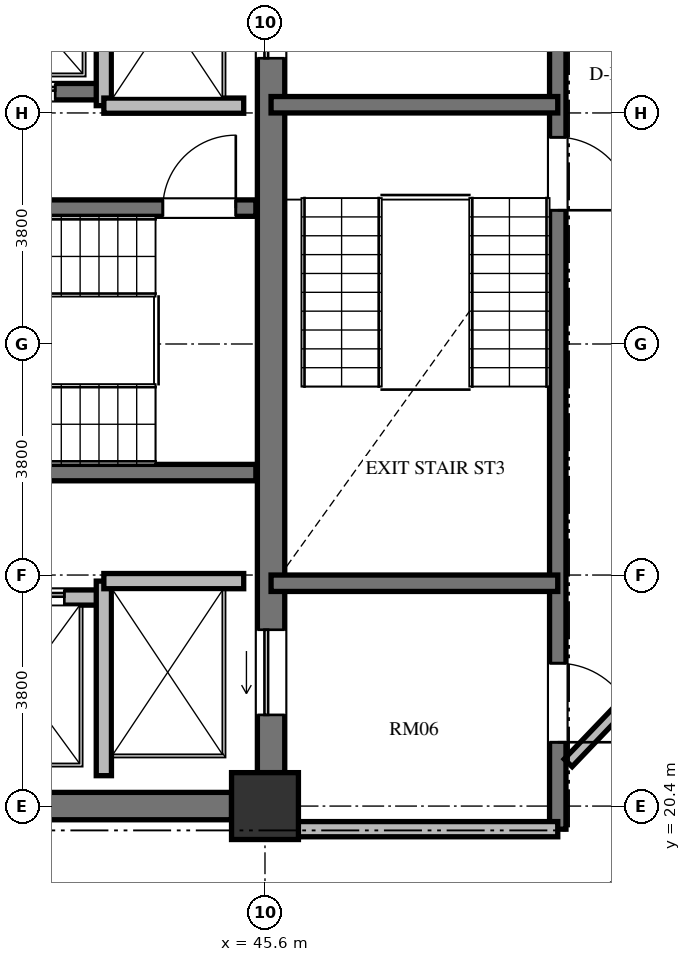
"""IFC4 building model, lengths in metres.
Left out: names, types, materials, properties, quantities, classifications, styles, units other than length and angle.
Written with IfcOpenShell. Run it as: python <this file> out.ifc"""

import sys

from ifc_helpers import new_model, si_unit, direction, frame, frame_2d, origin, origin_2d, place, context, subcontext, project, spatial, rectangle, extrude, element, fill, save


model = new_model("IFC4")
c1 = context("Model", 3, precision=1e-05, world=origin(), true_north=direction((0.0, 1.0)))
c2 = subcontext(c1, "Body", "Model", "MODEL_VIEW")
j1 = project(units=[si_unit("LENGTHUNIT", "METRE"), si_unit("PLANEANGLEUNIT", "RADIAN")], contexts=[c1])
p1 = place(None, origin())
s1 = spatial("IfcSite", under=j1, at=p1, CompositionType="ELEMENT")
p2 = place(p1, origin())
s2 = spatial("IfcBuilding", under=s1, at=p2, CompositionType="ELEMENT")
p3 = place(p2, frame((0.0, 0.0, 242.256)))
s3 = spatial("IfcBuildingStorey", under=s2, at=p3, CompositionType="ELEMENT", Elevation=242.256)
p4 = place(p3, frame((45.6, 20.4, 0.0), z_axis=(0.0, 0.0, 1.0), x_axis=(1.0, 0.0, 0.0)))
e1 = element("IfcColumn", 1, at=p4, inside=s3, PredefinedType="COLUMN", context=c2, shape_type="SweptSolid", body=[
    extrude(rectangle(XDim=1.1, YDim=1.1, at=origin_2d()), origin(), (0.0, 0.0, 1.0), 3.648),
])
p5 = place(p3, frame((45.7, 20.95, 0.0), z_axis=(0.0, 0.0, 1.0), x_axis=(0.0, 1.0, 0.0)))
e2 = element("IfcWall", 2, at=p5, inside=s3, PredefinedType="SHEAR", context=c2, shape_type="SweptSolid", body=[
    extrude(rectangle(XDim=14.1, YDim=0.45, at=frame_2d((7.05, 0.0))), origin(), (0.0, 0.0, 1.0), 3.648),
])
p6 = place(p5, frame((11.75, 0.0, 0.0)))
e3 = element("IfcOpeningElement", 3, at=p6, cuts=e2, PredefinedType="OPENING", context=c2, shape_type="SweptSolid", body=[
    extrude(rectangle(XDim=1.4, YDim=2.3, at=frame_2d((0.7, 1.15))), frame((0.0, 0.235, 0.0), z_axis=(0.0, -1.0, 0.0), x_axis=(1.0, 0.0, 0.0)), (0.0, 0.0, 1.0), 0.47),
])
p7 = place(p5, frame((0.95, 0.0, 0.0)))
e4 = element("IfcOpeningElement", 4, at=p7, cuts=e2, PredefinedType="OPENING", context=c2, shape_type="SweptSolid", body=[
    extrude(rectangle(XDim=1.4, YDim=2.3, at=frame_2d((0.7, 1.15))), frame((0.0, 0.235, 0.0), z_axis=(0.0, -1.0, 0.0), x_axis=(1.0, 0.0, 0.0)), (0.0, 0.0, 1.0), 0.47),
])
p8 = place(p3, frame((39.6, 20.4, 0.0), z_axis=(0.0, 0.0, 1.0), x_axis=(1.0, 0.0, 0.0)))
e5 = element("IfcWall", 5, at=p8, inside=s3, PredefinedType="SHEAR", context=c2, shape_type="SweptSolid", body=[
    extrude(rectangle(XDim=5.45, YDim=0.45, at=frame_2d((2.725, 0.0))), origin(), (0.0, 0.0, 1.0), 3.648),
])
p9 = place(p3, frame((37.465, 30.235, 0.0), z_axis=(0.0, 0.0, 1.0), x_axis=(1.0, 0.0, 0.0)))
e6 = element("IfcWall", 6, at=p9, inside=s3, PredefinedType="SHEAR", context=c2, shape_type="SweptSolid", body=[
    extrude(rectangle(XDim=7.985, YDim=0.27, at=frame_2d((3.992, 0.0))), origin(), (0.0, 0.0, 1.0), 3.648),
])
p10 = place(p9, frame((6.455, 0.0, 0.0)))
e7 = element("IfcOpeningElement", 7, at=p10, cuts=e6, PredefinedType="OPENING", context=c2, shape_type="SweptSolid", body=[
    extrude(rectangle(XDim=1.2, YDim=2.15, at=frame_2d((0.6, 1.075))), frame((0.0, 0.145, 0.0), z_axis=(0.0, -1.0, 0.0), x_axis=(1.0, 0.0, 0.0)), (0.0, 0.0, 1.0), 0.29),
])
p11 = place(p3, frame((37.465, 25.885, 0.0), z_axis=(0.0, 0.0, 1.0), x_axis=(1.0, 0.0, 0.0)))
e8 = element("IfcWall", 8, at=p11, inside=s3, PredefinedType="SHEAR", context=c2, shape_type="SweptSolid", body=[
    extrude(rectangle(XDim=7.985, YDim=0.27, at=frame_2d((3.992, 0.0))), origin(), (0.0, 0.0, 1.0), 3.648),
])
p12 = place(p3, frame((26.55, 32.15, 0.0), z_axis=(0.0, 0.0, 1.0), x_axis=(1.0, 0.0, 0.0)))
e9 = element("IfcWall", 9, at=p12, inside=s3, PredefinedType="SHEAR", context=c2, shape_type="SweptSolid", body=[
    extrude(rectangle(XDim=16.4, YDim=0.27, at=frame_2d((8.2, 0.0))), origin(), (0.0, 0.0, 1.0), 3.648),
])
p13 = place(p12, frame((5.125, 0.0, 0.0)))
e10 = element("IfcOpeningElement", 10, at=p13, cuts=e9, PredefinedType="OPENING", context=c2, shape_type="SweptSolid", body=[
    extrude(rectangle(XDim=1.05, YDim=2.15, at=frame_2d((0.525, 1.075))), frame((0.0, 0.145, 0.0), z_axis=(0.0, -1.0, 0.0), x_axis=(1.0, 0.0, 0.0)), (0.0, 0.0, 1.0), 0.29),
])
p14 = place(p12, frame((11.9, 0.0, 0.0)))
e11 = element("IfcOpeningElement", 11, at=p14, cuts=e9, PredefinedType="OPENING", context=c2, shape_type="SweptSolid", body=[
    extrude(rectangle(XDim=1.1, YDim=2.2, at=frame_2d((0.55, 1.1))), frame((0.0, 0.145, 0.0), z_axis=(0.0, -1.0, 0.0), x_axis=(1.0, 0.0, 0.0)), (0.0, 0.0, 1.0), 0.29),
])
p15 = place(p12, frame((14.5, 0.0, 0.0)))
e12 = element("IfcOpeningElement", 12, at=p15, cuts=e9, PredefinedType="OPENING", context=c2, shape_type="SweptSolid", body=[
    extrude(rectangle(XDim=1.1, YDim=2.2, at=frame_2d((0.55, 1.1))), frame((0.0, 0.145, 0.0), z_axis=(0.0, -1.0, 0.0), x_axis=(1.0, 0.0, 0.0)), (0.0, 0.0, 1.0), 0.29),
])
p16 = place(p3, frame((26.75, 23.83, 0.0), z_axis=(0.0, 0.0, 1.0), x_axis=(1.0, 0.0, 0.0)))
e13 = element("IfcWall", 13, at=p16, inside=s3, PredefinedType="SOLIDWALL", context=c2, shape_type="SweptSolid", body=[
    extrude(rectangle(XDim=16.2, YDim=0.25, at=frame_2d((8.1, 0.0))), origin(), (0.0, 0.0, 1.0), 3.198),
])
p17 = place(p16, frame((4.75, 0.0, 0.0)))
e14 = element("IfcOpeningElement", 14, at=p17, cuts=e13, PredefinedType="OPENING", context=c2, shape_type="SweptSolid", body=[
    extrude(rectangle(XDim=1.4, YDim=2.2, at=frame_2d((0.7, 1.1))), frame((0.0, 0.135, 0.0), z_axis=(0.0, -1.0, 0.0), x_axis=(1.0, 0.0, 0.0)), (0.0, 0.0, 1.0), 0.27),
])
p18 = place(p16, frame((11.7, 0.0, 0.0)))
e15 = element("IfcOpeningElement", 15, at=p18, cuts=e13, PredefinedType="OPENING", context=c2, shape_type="SweptSolid", body=[
    extrude(rectangle(XDim=1.1, YDim=2.2, at=frame_2d((0.55, 1.1))), frame((0.0, 0.135, 0.0), z_axis=(0.0, -1.0, 0.0), x_axis=(1.0, 0.0, 0.0)), (0.0, 0.0, 1.0), 0.27),
])
p19 = place(p16, frame((14.15, 0.0, 0.0)))
e16 = element("IfcOpeningElement", 16, at=p19, cuts=e13, PredefinedType="OPENING", context=c2, shape_type="SweptSolid", body=[
    extrude(rectangle(XDim=1.4, YDim=2.3, at=frame_2d((0.7, 1.15))), frame((0.0, 0.135, 0.0), z_axis=(0.0, -1.0, 0.0), x_axis=(1.0, 0.0, 0.0)), (0.0, 0.0, 1.0), 0.27),
])
p20 = place(p3, frame((42.95, 31.92, 0.0), z_axis=(0.0, 0.0, 1.0), x_axis=(0.0, 1.0, 0.0)))
e17 = element("IfcWall", 17, at=p20, inside=s3, PredefinedType="SOLIDWALL", context=c2, shape_type="SweptSolid", body=[
    extrude(rectangle(XDim=3.18, YDim=0.25, at=frame_2d((1.59, 0.0))), origin(), (0.0, 0.0, 1.0), 3.198),
])
p21 = place(p3, frame((42.95, 31.92, 0.0), z_axis=(0.0, 0.0, 1.0), x_axis=(1.0, 0.0, 0.0)))
e18 = element("IfcWall", 18, at=p21, inside=s3, PredefinedType="SOLIDWALL", context=c2, shape_type="SweptSolid", body=[
    extrude(rectangle(XDim=2.3, YDim=0.25, at=frame_2d((1.15, 0.0))), origin(), (0.0, 0.0, 1.0), 3.198),
])
p22 = place(p3, frame((42.95, 20.9, 0.0), z_axis=(0.0, 0.0, 1.0), x_axis=(0.0, 1.0, 0.0)))
e19 = element("IfcWall", 19, at=p22, inside=s3, PredefinedType="SOLIDWALL", context=c2, shape_type="SweptSolid", body=[
    extrude(rectangle(XDim=3.2, YDim=0.25, at=frame_2d((1.6, 0.0))), origin(), (0.0, 0.0, 1.0), 3.198),
])
p23 = place(p3, frame((42.95, 24.1, 0.0), z_axis=(0.0, 0.0, 1.0), x_axis=(1.0, 0.0, 0.0)))
e20 = element("IfcWall", 20, at=p23, inside=s3, PredefinedType="SOLIDWALL", context=c2, shape_type="SweptSolid", body=[
    extrude(rectangle(XDim=2.3, YDim=0.25, at=frame_2d((1.15, 0.0))), origin(), (0.0, 0.0, 1.0), 3.198),
])
p24 = place(p3, frame((50.415, 35.845, 0.0), z_axis=(0.0, 0.0, 1.0), x_axis=(0.0, -1.0, 0.0)))
e21 = element("IfcWall", 21, at=p24, inside=s3, PredefinedType="SHEAR", context=c2, shape_type="SweptSolid", body=[
    extrude(rectangle(XDim=15.825, YDim=0.27, at=frame_2d((7.913, 0.0))), origin(), (0.0, 0.0, 1.0), 3.648),
])
p25 = place(p24, frame((4.445, 0.0, 0.0)))
e22 = element("IfcOpeningElement", 22, at=p25, cuts=e21, PredefinedType="OPENING", context=c2, shape_type="SweptSolid", body=[
    extrude(rectangle(XDim=1.2, YDim=2.15, at=frame_2d((0.6, 1.075))), frame((0.0, 0.145, 0.0), z_axis=(0.0, -1.0, 0.0), x_axis=(1.0, 0.0, 0.0)), (0.0, 0.0, 1.0), 0.29),
])
p26 = place(p24, frame((1.295, 0.0, 0.0)))
e23 = element("IfcOpeningElement", 23, at=p26, cuts=e21, PredefinedType="OPENING", context=c2, shape_type="SweptSolid", body=[
    extrude(rectangle(XDim=1.3, YDim=2.2, at=frame_2d((0.65, 1.1))), frame((0.0, 0.145, 0.0), z_axis=(0.0, -1.0, 0.0), x_axis=(1.0, 0.0, 0.0)), (0.0, 0.0, 1.0), 0.29),
])
p27 = place(p24, frame((13.095, 0.0, 0.0)))
e24 = element("IfcOpeningElement", 24, at=p27, cuts=e21, PredefinedType="OPENING", context=c2, shape_type="SweptSolid", body=[
    extrude(rectangle(XDim=1.3, YDim=2.2, at=frame_2d((0.65, 1.1))), frame((0.0, 0.145, 0.0), z_axis=(0.0, -1.0, 0.0), x_axis=(1.0, 0.0, 0.0)), (0.0, 0.0, 1.0), 0.29),
])
for number, where, z_axis, x_axis in (
    (25, (45.7, 31.935, 0.0), (0.0, 0.0, 1.0), (1.0, 0.0, 0.0)),
    (26, (45.7, 24.065, 0.0), (0.0, 0.0, 1.0), (1.0, 0.0, 0.0)),
):
    element("IfcWall", number, at=place(p3, frame(where, z_axis=z_axis, x_axis=x_axis)), inside=s3, PredefinedType="SHEAR", context=c2, shape_type="SweptSolid", body=[
        extrude(rectangle(XDim=4.715, YDim=0.27, at=frame_2d((2.357, 0.0))), origin(), (0.0, 0.0, 1.0), 3.648),
    ])
p28 = place(p3, frame((45.7, 20.02, 0.0), z_axis=(0.0, 0.0, 1.0), x_axis=(1.0, 0.0, 0.0)))
e27 = element("IfcWall", 27, at=p28, inside=s3, PredefinedType="SOLIDWALL", context=c2, shape_type="SweptSolid", body=[
    extrude(rectangle(XDim=4.715, YDim=0.25, at=frame_2d((2.357, 0.0))), origin(), (0.0, 0.0, 1.0), 3.198),
])
p29 = place(p3, frame((53.078, 23.714, 0.0), z_axis=(0.0, 0.0, 1.0), x_axis=(-0.691353379446, -0.722516785085, 0.0)))
e28 = element("IfcWall", 28, at=p29, inside=s3, PredefinedType="PARTITIONING", context=c2, shape_type="SweptSolid", body=[
    extrude(rectangle(XDim=3.604, YDim=0.18, at=frame_2d((1.802, 0.0))), origin(), (0.0, 0.0, 1.0), 3.198),
])
p30 = place(p10, origin())
e29 = element("IfcDoor", 29, at=p30, inside=s3, OperationType="SINGLE_SWING_RIGHT", PredefinedType="DOOR", context=c2, shape_type="SweptSolid", body=[
    extrude(rectangle(XDim=1.2, YDim=2.15, at=frame_2d((0.6, 1.075))), frame((0.0, 0.025, 0.0), z_axis=(0.0, -1.0, 0.0), x_axis=(1.0, 0.0, 0.0)), (0.0, 0.0, 1.0), 0.05),
])
fill(e7, e29)
p31 = place(p15, origin())
e30 = element("IfcDoor", 30, at=p31, inside=s3, OperationType="SLIDING_TO_LEFT", PredefinedType="DOOR", context=c2, shape_type="SweptSolid", body=[
    extrude(rectangle(XDim=1.1, YDim=2.2, at=frame_2d((0.55, 1.1))), frame((0.0, 0.025, 0.0), z_axis=(0.0, -1.0, 0.0), x_axis=(1.0, 0.0, 0.0)), (0.0, 0.0, 1.0), 0.05),
])
fill(e12, e30)
p32 = place(p6, origin())
e31 = element("IfcDoor", 31, at=p32, inside=s3, OperationType="SLIDING_TO_LEFT", PredefinedType="DOOR", context=c2, shape_type="SweptSolid", body=[
    extrude(rectangle(XDim=1.4, YDim=2.3, at=frame_2d((0.7, 1.15))), frame((0.0, 0.025, 0.0), z_axis=(0.0, -1.0, 0.0), x_axis=(1.0, 0.0, 0.0)), (0.0, 0.0, 1.0), 0.05),
])
fill(e3, e31)
p33 = place(p7, origin())
e32 = element("IfcDoor", 32, at=p33, inside=s3, OperationType="SLIDING_TO_LEFT", PredefinedType="DOOR", context=c2, shape_type="SweptSolid", body=[
    extrude(rectangle(XDim=1.4, YDim=2.3, at=frame_2d((0.7, 1.15))), frame((0.0, 0.025, 0.0), z_axis=(0.0, -1.0, 0.0), x_axis=(1.0, 0.0, 0.0)), (0.0, 0.0, 1.0), 0.05),
])
fill(e4, e32)
p34 = place(p19, origin())
e33 = element("IfcDoor", 33, at=p34, inside=s3, OperationType="SLIDING_TO_LEFT", PredefinedType="DOOR", context=c2, shape_type="SweptSolid", body=[
    extrude(rectangle(XDim=1.4, YDim=2.3, at=frame_2d((0.7, 1.15))), frame((0.0, 0.025, 0.0), z_axis=(0.0, -1.0, 0.0), x_axis=(1.0, 0.0, 0.0)), (0.0, 0.0, 1.0), 0.05),
])
fill(e16, e33)
p35 = place(p25, origin())
e34 = element("IfcDoor", 34, at=p35, inside=s3, OperationType="SINGLE_SWING_RIGHT", PredefinedType="DOOR", context=c2, shape_type="SweptSolid", body=[
    extrude(rectangle(XDim=1.2, YDim=2.15, at=frame_2d((0.6, 1.075))), frame((0.0, 0.025, 0.0), z_axis=(0.0, -1.0, 0.0), x_axis=(1.0, 0.0, 0.0)), (0.0, 0.0, 1.0), 0.05),
])
fill(e22, e34)
p36 = place(p27, origin())
e35 = element("IfcDoor", 35, at=p36, inside=s3, OperationType="SINGLE_SWING_RIGHT", PredefinedType="DOOR", context=c2, shape_type="SweptSolid", body=[
    extrude(rectangle(XDim=1.3, YDim=2.2, at=frame_2d((0.65, 1.1))), frame((0.0, 0.025, 0.0), z_axis=(0.0, -1.0, 0.0), x_axis=(1.0, 0.0, 0.0)), (0.0, 0.0, 1.0), 0.05),
])
fill(e24, e35)
save(model, sys.argv[1])
